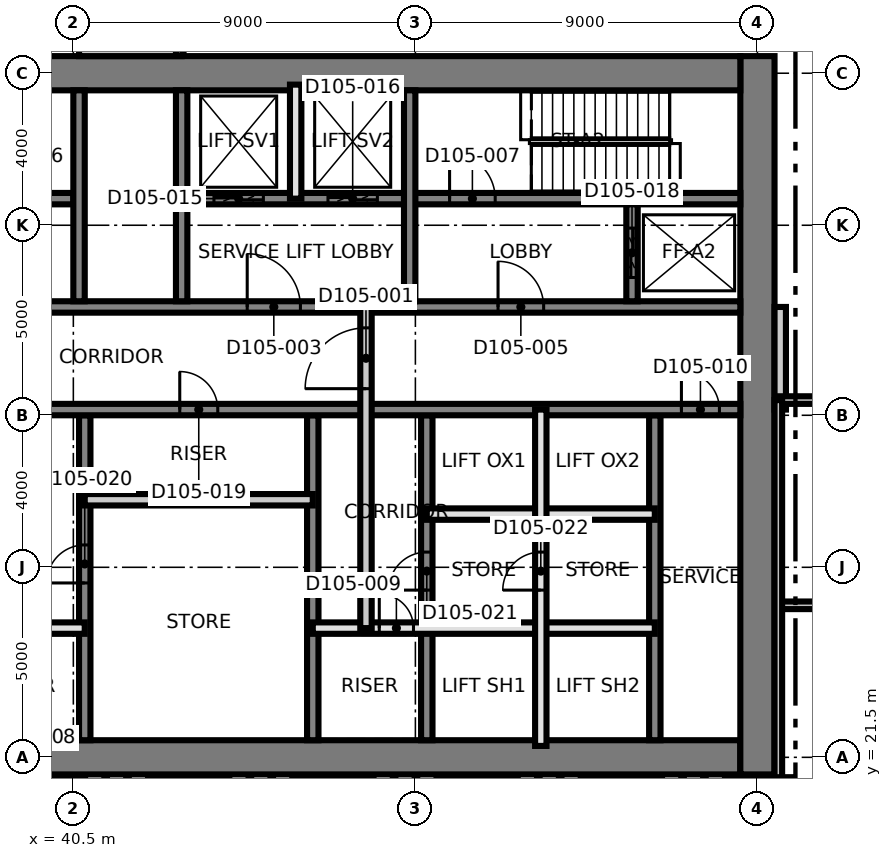
"""IFC4 building model, lengths in metres.
Left out: names, types, materials, properties, quantities, classifications, styles, units other than length and angle.
Written with IfcOpenShell. Run it as: python <this file> out.ifc"""

import sys

from ifc_helpers import new_model, si_unit, direction, frame, frame_2d, origin, place, context, subcontext, project, spatial, rectangle, extrude, element, fill, save


model = new_model("IFC4")
c1 = context("Model", 3, precision=1e-05, world=origin(), true_north=direction((0.0, 1.0)))
c2 = subcontext(c1, "Body", "Model", "MODEL_VIEW")
j1 = project(units=[si_unit("LENGTHUNIT", "METRE"), si_unit("PLANEANGLEUNIT", "RADIAN")], contexts=[c1])
p1 = place(None, origin())
s1 = spatial("IfcSite", under=j1, at=p1, CompositionType="ELEMENT")
p2 = place(p1, origin())
s2 = spatial("IfcBuilding", under=s1, at=p2, CompositionType="ELEMENT")
p3 = place(p2, frame((0.0, 0.0, 18.5)))
s3 = spatial("IfcBuildingStorey", under=s2, at=p3, CompositionType="ELEMENT", Elevation=18.5)
p4 = place(p3, frame((31.05, 21.5, 0.0), z_axis=(0.0, 0.0, 1.0), x_axis=(1.0, 0.0, 0.0)))
e1 = element("IfcWall", 1, at=p4, inside=s3, PredefinedType="SHEAR", context=c2, shape_type="SweptSolid", body=[
    extrude(rectangle(XDim=27.0, YDim=0.9, at=frame_2d((13.5, 0.0))), origin(), (0.0, 0.0, 1.0), 5.0),
])
p5 = place(p3, frame((58.5, 21.05, 0.0), z_axis=(0.0, 0.0, 1.0), x_axis=(0.0, 1.0, 0.0)))
e2 = element("IfcWall", 2, at=p5, inside=s3, PredefinedType="SHEAR", context=c2, shape_type="SweptSolid", body=[
    extrude(rectangle(XDim=18.9, YDim=0.9, at=frame_2d((9.45, 0.0))), origin(), (0.0, 0.0, 1.0), 5.0),
])
p6 = place(p3, frame((31.05, 39.5, 0.0), z_axis=(0.0, 0.0, 1.0), x_axis=(1.0, 0.0, 0.0)))
e3 = element("IfcWall", 3, at=p6, inside=s3, PredefinedType="SHEAR", context=c2, shape_type="SweptSolid", body=[
    extrude(rectangle(XDim=27.0, YDim=0.9, at=frame_2d((13.5, 0.0))), origin(), (0.0, 0.0, 1.0), 5.0),
])
p7 = place(p3, frame((40.8, 21.95, 0.0), z_axis=(0.0, 0.0, 1.0), x_axis=(0.0, 1.0, 0.0)))
e4 = element("IfcWall", 4, at=p7, inside=s3, PredefinedType="SHEAR", context=c2, shape_type="SweptSolid", body=[
    extrude(rectangle(XDim=8.55, YDim=0.3, at=frame_2d((4.275, 0.0))), origin(), (0.0, 0.0, 1.0), 5.0),
])
p8 = place(p7, frame((4.138, 0.0, 0.0)))
e5 = element("IfcOpeningElement", 5, at=p8, cuts=e4, PredefinedType="OPENING", context=c2, shape_type="SweptSolid", body=[
    extrude(rectangle(XDim=1.0, YDim=2.1, at=frame_2d((0.5, 1.05))), frame((0.0, 0.16, 0.0), z_axis=(0.0, -1.0, 0.0), x_axis=(1.0, 0.0, 0.0)), (0.0, 0.0, 1.0), 0.32),
])
p9 = place(p3, frame((46.8, 21.95, 0.0), z_axis=(0.0, 0.0, 1.0), x_axis=(0.0, 1.0, 0.0)))
e6 = element("IfcWall", 6, at=p9, inside=s3, PredefinedType="SHEAR", context=c2, shape_type="SweptSolid", body=[
    extrude(rectangle(XDim=8.55, YDim=0.3, at=frame_2d((4.275, 0.0))), origin(), (0.0, 0.0, 1.0), 5.0),
])
p10 = place(p3, frame((49.8, 21.95, 0.0), z_axis=(0.0, 0.0, 1.0), x_axis=(0.0, 1.0, 0.0)))
e7 = element("IfcWall", 7, at=p10, inside=s3, PredefinedType="SHEAR", context=c2, shape_type="SweptSolid", body=[
    extrude(rectangle(XDim=8.55, YDim=0.3, at=frame_2d((4.275, 0.0))), origin(), (0.0, 0.0, 1.0), 5.0),
])
p11 = place(p10, frame((3.95, 0.0, 0.0)))
e8 = element("IfcOpeningElement", 8, at=p11, cuts=e7, PredefinedType="OPENING", context=c2, shape_type="SweptSolid", body=[
    extrude(rectangle(XDim=1.0, YDim=2.1, at=frame_2d((0.5, 1.05))), frame((0.0, 0.16, 0.0), z_axis=(0.0, -1.0, 0.0), x_axis=(1.0, 0.0, 0.0)), (0.0, 0.0, 1.0), 0.32),
])
p12 = place(p3, frame((55.8, 21.95, 0.0), z_axis=(0.0, 0.0, 1.0), x_axis=(0.0, 1.0, 0.0)))
e9 = element("IfcWall", 9, at=p12, inside=s3, PredefinedType="SHEAR", context=c2, shape_type="SweptSolid", body=[
    extrude(rectangle(XDim=8.55, YDim=0.3, at=frame_2d((4.275, 0.0))), origin(), (0.0, 0.0, 1.0), 5.0),
])
p13 = place(p3, frame((31.95, 30.65, 0.0), z_axis=(0.0, 0.0, 1.0), x_axis=(1.0, 0.0, 0.0)))
e10 = element("IfcWall", 10, at=p13, inside=s3, PredefinedType="SHEAR", context=c2, shape_type="SweptSolid", body=[
    extrude(rectangle(XDim=26.1, YDim=0.3, at=frame_2d((13.05, 0.0))), origin(), (0.0, 0.0, 1.0), 5.0),
])
p14 = place(p13, frame((24.55, 0.0, 0.0)))
e11 = element("IfcOpeningElement", 11, at=p14, cuts=e10, PredefinedType="OPENING", context=c2, shape_type="SweptSolid", body=[
    extrude(rectangle(XDim=1.0, YDim=2.1, at=frame_2d((0.5, 1.05))), frame((0.0, 0.16, 0.0), z_axis=(0.0, -1.0, 0.0), x_axis=(1.0, 0.0, 0.0)), (0.0, 0.0, 1.0), 0.32),
])
p15 = place(p13, frame((11.35, 0.0, 0.0)))
e12 = element("IfcOpeningElement", 12, at=p15, cuts=e10, PredefinedType="OPENING", context=c2, shape_type="SweptSolid", body=[
    extrude(rectangle(XDim=1.0, YDim=2.1, at=frame_2d((0.5, 1.05))), frame((0.0, 0.16, 0.0), z_axis=(0.0, -1.0, 0.0), x_axis=(1.0, 0.0, 0.0)), (0.0, 0.0, 1.0), 0.32),
])
p16 = place(p3, frame((31.95, 33.35, 0.0), z_axis=(0.0, 0.0, 1.0), x_axis=(1.0, 0.0, 0.0)))
e13 = element("IfcWall", 13, at=p16, inside=s3, PredefinedType="SHEAR", context=c2, shape_type="SweptSolid", body=[
    extrude(rectangle(XDim=26.1, YDim=0.3, at=frame_2d((13.05, 0.0))), origin(), (0.0, 0.0, 1.0), 5.0),
])
p17 = place(p16, frame((13.125, 0.0, 0.0)))
e14 = element("IfcOpeningElement", 14, at=p17, cuts=e13, PredefinedType="OPENING", context=c2, shape_type="SweptSolid", body=[
    extrude(rectangle(XDim=1.4, YDim=2.1, at=frame_2d((0.7, 1.05))), frame((0.0, 0.16, 0.0), z_axis=(0.0, -1.0, 0.0), x_axis=(1.0, 0.0, 0.0)), (0.0, 0.0, 1.0), 0.32),
])
p18 = place(p16, frame((5.175, 0.0, 0.0)))
e15 = element("IfcOpeningElement", 15, at=p18, cuts=e13, PredefinedType="OPENING", context=c2, shape_type="SweptSolid", body=[
    extrude(rectangle(XDim=1.2, YDim=2.1, at=frame_2d((0.6, 1.05))), frame((0.0, 0.16, 0.0), z_axis=(0.0, -1.0, 0.0), x_axis=(1.0, 0.0, 0.0)), (0.0, 0.0, 1.0), 0.32),
])
p19 = place(p16, frame((19.725, 0.0, 0.0)))
e16 = element("IfcOpeningElement", 16, at=p19, cuts=e13, PredefinedType="OPENING", context=c2, shape_type="SweptSolid", body=[
    extrude(rectangle(XDim=1.2, YDim=2.1, at=frame_2d((0.6, 1.05))), frame((0.0, 0.16, 0.0), z_axis=(0.0, -1.0, 0.0), x_axis=(1.0, 0.0, 0.0)), (0.0, 0.0, 1.0), 0.32),
])
p20 = place(p3, frame((31.95, 36.2, 0.0), z_axis=(0.0, 0.0, 1.0), x_axis=(1.0, 0.0, 0.0)))
e17 = element("IfcWall", 17, at=p20, inside=s3, PredefinedType="SHEAR", context=c2, shape_type="SweptSolid", body=[
    extrude(rectangle(XDim=8.55, YDim=0.3, at=frame_2d((4.275, 0.0))), origin(), (0.0, 0.0, 1.0), 5.0),
])
p21 = place(p20, frame((6.45, 0.0, 0.0)))
e18 = element("IfcOpeningElement", 18, at=p21, cuts=e17, PredefinedType="OPENING", context=c2, shape_type="SweptSolid", body=[
    extrude(rectangle(XDim=1.2, YDim=2.1, at=frame_2d((0.6, 1.05))), frame((0.0, 0.16, 0.0), z_axis=(0.0, -1.0, 0.0), x_axis=(1.0, 0.0, 0.0)), (0.0, 0.0, 1.0), 0.32),
])
p22 = place(p3, frame((43.5, 36.2, 0.0), z_axis=(0.0, 0.0, 1.0), x_axis=(1.0, 0.0, 0.0)))
e19 = element("IfcWall", 19, at=p22, inside=s3, PredefinedType="SHEAR", context=c2, shape_type="SweptSolid", body=[
    extrude(rectangle(XDim=14.55, YDim=0.3, at=frame_2d((7.275, 0.0))), origin(), (0.0, 0.0, 1.0), 5.0),
])
p23 = place(p22, frame((6.9, 0.0, 0.0)))
e20 = element("IfcOpeningElement", 20, at=p23, cuts=e19, PredefinedType="OPENING", context=c2, shape_type="SweptSolid", body=[
    extrude(rectangle(XDim=1.2, YDim=2.1, at=frame_2d((0.6, 1.05))), frame((0.0, 0.16, 0.0), z_axis=(0.0, -1.0, 0.0), x_axis=(1.0, 0.0, 0.0)), (0.0, 0.0, 1.0), 0.32),
])
p24 = place(p22, frame((0.7, 0.0, 0.0)))
e21 = element("IfcOpeningElement", 21, at=p24, cuts=e19, PredefinedType="OPENING", context=c2, shape_type="SweptSolid", body=[
    extrude(rectangle(XDim=1.3, YDim=2.4, at=frame_2d((0.65, 1.2))), frame((0.0, 0.16, 0.0), z_axis=(0.0, -1.0, 0.0), x_axis=(1.0, 0.0, 0.0)), (0.0, 0.0, 1.0), 0.32),
])
p25 = place(p22, frame((3.7, 0.0, 0.0)))
e22 = element("IfcOpeningElement", 22, at=p25, cuts=e19, PredefinedType="OPENING", context=c2, shape_type="SweptSolid", body=[
    extrude(rectangle(XDim=1.3, YDim=2.4, at=frame_2d((0.65, 1.2))), frame((0.0, 0.16, 0.0), z_axis=(0.0, -1.0, 0.0), x_axis=(1.0, 0.0, 0.0)), (0.0, 0.0, 1.0), 0.32),
])
for number, where, z_axis, x_axis in (
    (23, (40.65, 33.5, 0.0), (0.0, 0.0, 1.0), (0.0, 1.0, 0.0)),
    (24, (43.35, 33.5, 0.0), (0.0, 0.0, 1.0), (0.0, 1.0, 0.0)),
    (25, (49.35, 33.5, 0.0), (0.0, 0.0, 1.0), (0.0, 1.0, 0.0)),
):
    element("IfcWall", number, at=place(p3, frame(where, z_axis=z_axis, x_axis=x_axis)), inside=s3, PredefinedType="SHEAR", context=c2, shape_type="SweptSolid", body=[
        extrude(rectangle(XDim=5.55, YDim=0.3, at=frame_2d((2.775, 0.0))), origin(), (0.0, 0.0, 1.0), 5.0),
    ])
p26 = place(p3, frame((55.2, 33.5, 0.0), z_axis=(0.0, 0.0, 1.0), x_axis=(0.0, 1.0, 0.0)))
e26 = element("IfcWall", 26, at=p26, inside=s3, PredefinedType="SHEAR", context=c2, shape_type="SweptSolid", body=[
    extrude(rectangle(XDim=2.55, YDim=0.3, at=frame_2d((1.275, 0.0))), origin(), (0.0, 0.0, 1.0), 5.0),
])
p27 = place(p26, frame((0.625, 0.0, 0.0)))
e27 = element("IfcOpeningElement", 27, at=p27, cuts=e26, PredefinedType="OPENING", context=c2, shape_type="SweptSolid", body=[
    extrude(rectangle(XDim=1.3, YDim=2.4, at=frame_2d((0.65, 1.2))), frame((0.0, 0.16, 0.0), z_axis=(0.0, -1.0, 0.0), x_axis=(1.0, 0.0, 0.0)), (0.0, 0.0, 1.0), 0.32),
])
p28 = place(p3, frame((31.8, 24.9, 0.0), z_axis=(0.0, 0.0, 1.0), x_axis=(1.0, 0.0, 0.0)))
e28 = element("IfcWall", 28, at=p28, inside=s3, PredefinedType="SOLIDWALL", context=c2, shape_type="SweptSolid", body=[
    extrude(rectangle(XDim=9.0, YDim=0.3, at=frame_2d((4.5, 0.0))), origin(), (0.0, 0.0, 1.0), 4.7),
])
p29 = place(p28, frame((7.05, 0.0, 0.0)))
e29 = element("IfcOpeningElement", 29, at=p29, cuts=e28, PredefinedType="OPENING", context=c2, shape_type="SweptSolid", body=[
    extrude(rectangle(XDim=0.9, YDim=2.1, at=frame_2d((0.45, 1.05))), frame((0.0, 0.16, 0.0), z_axis=(0.0, -1.0, 0.0), x_axis=(1.0, 0.0, 0.0)), (0.0, 0.0, 1.0), 0.32),
])
p30 = place(p28, frame((0.95, 0.0, 0.0)))
e30 = element("IfcOpeningElement", 30, at=p30, cuts=e28, PredefinedType="OPENING", context=c2, shape_type="SweptSolid", body=[
    extrude(rectangle(XDim=1.1, YDim=2.4, at=frame_2d((0.55, 1.2))), frame((0.0, 0.16, 0.0), z_axis=(0.0, -1.0, 0.0), x_axis=(1.0, 0.0, 0.0)), (0.0, 0.0, 1.0), 0.32),
])
p31 = place(p28, frame((3.95, 0.0, 0.0)))
e31 = element("IfcOpeningElement", 31, at=p31, cuts=e28, PredefinedType="OPENING", context=c2, shape_type="SweptSolid", body=[
    extrude(rectangle(XDim=1.1, YDim=2.4, at=frame_2d((0.55, 1.2))), frame((0.0, 0.16, 0.0), z_axis=(0.0, -1.0, 0.0), x_axis=(1.0, 0.0, 0.0)), (0.0, 0.0, 1.0), 0.32),
])
p32 = place(p3, frame((46.8, 24.9, 0.0), z_axis=(0.0, 0.0, 1.0), x_axis=(1.0, 0.0, 0.0)))
e32 = element("IfcWall", 32, at=p32, inside=s3, PredefinedType="SOLIDWALL", context=c2, shape_type="SweptSolid", body=[
    extrude(rectangle(XDim=9.0, YDim=0.3, at=frame_2d((4.5, 0.0))), origin(), (0.0, 0.0, 1.0), 4.7),
])
p33 = place(p32, frame((1.75, 0.0, 0.0)))
e33 = element("IfcOpeningElement", 33, at=p33, cuts=e32, PredefinedType="OPENING", context=c2, shape_type="SweptSolid", body=[
    extrude(rectangle(XDim=0.9, YDim=2.1, at=frame_2d((0.45, 1.05))), frame((0.0, 0.16, 0.0), z_axis=(0.0, -1.0, 0.0), x_axis=(1.0, 0.0, 0.0)), (0.0, 0.0, 1.0), 0.32),
])
p34 = place(p3, frame((49.8, 27.9, 0.0), z_axis=(0.0, 0.0, 1.0), x_axis=(1.0, 0.0, 0.0)))
e34 = element("IfcWall", 34, at=p34, inside=s3, PredefinedType="SOLIDWALL", context=c2, shape_type="SweptSolid", body=[
    extrude(rectangle(XDim=6.0, YDim=0.3, at=frame_2d((3.0, 0.0))), origin(), (0.0, 0.0, 1.0), 4.7),
])
p35 = place(p3, frame((40.8, 28.277, 0.0), z_axis=(0.0, 0.0, 1.0), x_axis=(1.0, 0.0, 0.0)))
e35 = element("IfcWall", 35, at=p35, inside=s3, PredefinedType="PARTITIONING", context=c2, shape_type="SweptSolid", body=[
    extrude(rectangle(XDim=6.0, YDim=0.3, at=frame_2d((3.0, 0.0))), origin(), (0.0, 0.0, 1.0), 4.7),
])
p36 = place(p3, frame((40.65, 40.1, 0.0), z_axis=(0.0, 0.0, 1.0), x_axis=(1.0, 0.0, 0.0)))
e36 = element("IfcWall", 36, at=p36, inside=s3, PredefinedType="PARTITIONING", context=c2, shape_type="SweptSolid", body=[
    extrude(rectangle(XDim=2.7, YDim=0.3, at=frame_2d((1.35, 0.0))), origin(), (0.0, 0.0, 1.0), 4.7),
])
p37 = place(p3, frame((46.35, 36.2, 0.0), z_axis=(0.0, 0.0, 1.0), x_axis=(0.0, 1.0, 0.0)))
e37 = element("IfcWall", 37, at=p37, inside=s3, PredefinedType="SOLIDWALL", context=c2, shape_type="SweptSolid", body=[
    extrude(rectangle(XDim=3.0, YDim=0.3, at=frame_2d((1.5, 0.0))), origin(), (0.0, 0.0, 1.0), 4.7),
])
p38 = place(p3, frame((48.2, 24.9, 0.0), z_axis=(0.0, 0.0, 1.0), x_axis=(0.0, 1.0, 0.0)))
e38 = element("IfcWall", 38, at=p38, inside=s3, PredefinedType="PARTITIONING", context=c2, shape_type="SweptSolid", body=[
    extrude(rectangle(XDim=8.45, YDim=0.3, at=frame_2d((4.225, 0.0))), origin(), (0.0, 0.0, 1.0), 4.7),
])
p39 = place(p38, frame((6.3, 0.0, 0.0)))
e39 = element("IfcOpeningElement", 39, at=p39, cuts=e38, PredefinedType="OPENING", context=c2, shape_type="SweptSolid", body=[
    extrude(rectangle(XDim=1.6, YDim=2.1, at=frame_2d((0.8, 1.05))), frame((0.0, 0.16, 0.0), z_axis=(0.0, -1.0, 0.0), x_axis=(1.0, 0.0, 0.0)), (0.0, 0.0, 1.0), 0.32),
])
p40 = place(p3, frame((52.8, 21.8, 0.0), z_axis=(0.0, 0.0, 1.0), x_axis=(0.0, 1.0, 0.0)))
e40 = element("IfcWall", 40, at=p40, inside=s3, PredefinedType="SOLIDWALL", context=c2, shape_type="SweptSolid", body=[
    extrude(rectangle(XDim=8.85, YDim=0.3, at=frame_2d((4.425, 0.0))), origin(), (0.0, 0.0, 1.0), 4.7),
])
p41 = place(p40, frame((4.1, 0.0, 0.0)))
e41 = element("IfcOpeningElement", 41, at=p41, cuts=e40, PredefinedType="OPENING", context=c2, shape_type="SweptSolid", body=[
    extrude(rectangle(XDim=1.0, YDim=2.1, at=frame_2d((0.5, 1.05))), frame((0.0, 0.16, 0.0), z_axis=(0.0, -1.0, 0.0), x_axis=(1.0, 0.0, 0.0)), (0.0, 0.0, 1.0), 0.32),
])
p42 = place(p3, frame((59.1, 30.65, 0.0), z_axis=(0.0, 0.0, 1.0), x_axis=(0.0, 1.0, 0.0)))
e42 = element("IfcWall", 42, at=p42, inside=s3, PredefinedType="PARTITIONING", context=c2, shape_type="SweptSolid", body=[
    extrude(rectangle(XDim=2.7, YDim=0.3, at=frame_2d((1.35, 0.0))), origin(), (0.0, 0.0, 1.0), 4.7),
])
p43 = place(p3, frame((59.05, 25.5, 0.0), z_axis=(0.0, 0.0, 1.0), x_axis=(1.0, 0.0, 0.0)))
e43 = element("IfcWall", 43, at=p43, inside=s3, PredefinedType="PARTITIONING", context=c2, shape_type="SweptSolid", body=[
    extrude(rectangle(XDim=23.45, YDim=0.2, at=frame_2d((11.725, 0.0))), origin(), (0.0, 0.0, 1.0), 4.7),
])
p44 = place(p3, frame((58.97, 30.9, 0.0), z_axis=(0.0, 0.0, 1.0), x_axis=(1.0, 0.0, 0.0)))
e44 = element("IfcWall", 44, at=p44, inside=s3, PredefinedType="PARTITIONING", context=c2, shape_type="SweptSolid", body=[
    extrude(rectangle(XDim=23.53, YDim=0.2, at=frame_2d((11.765, 0.0))), origin(), (0.0, 0.0, 1.0), 4.7),
])
p45 = place(p44, frame((13.98, 0.0, 0.0)))
e45 = element("IfcOpeningElement", 45, at=p45, cuts=e44, PredefinedType="OPENING", context=c2, shape_type="SweptSolid", body=[
    extrude(rectangle(XDim=1.0, YDim=2.1, at=frame_2d((0.5, 1.05))), frame((0.0, 0.11, 0.0), z_axis=(0.0, -1.0, 0.0), x_axis=(1.0, 0.0, 0.0)), (0.0, 0.0, 1.0), 0.22),
])
p46 = place(p3, frame((43.3, 39.97, 0.0), z_axis=(0.0, 0.0, 1.0), x_axis=(0.0, 1.0, 0.0)))
e46 = element("IfcWall", 46, at=p46, inside=s3, PredefinedType="PARTITIONING", context=c2, shape_type="SweptSolid", body=[
    extrude(rectangle(XDim=2.28, YDim=0.2, at=frame_2d((1.14, 0.0))), origin(), (0.0, 0.0, 1.0), 4.7),
])
p47 = place(p3, frame((59.05, 11.07, 0.0), z_axis=(0.0, 0.0, 1.0), x_axis=(0.0, 1.0, 0.0)))
e47 = element("IfcWall", 47, at=p47, inside=s3, PredefinedType="PARTITIONING", context=c2, shape_type="SweptSolid", body=[
    extrude(rectangle(XDim=19.83, YDim=0.2, at=frame_2d((9.915, 0.0))), origin(), (0.0, 0.0, 1.0), 4.7),
])
p48 = place(p39, origin())
e48 = element("IfcDoor", 48, at=p48, inside=s3, OperationType="SINGLE_SWING_LEFT", PredefinedType="DOOR", context=c2, shape_type="SweptSolid", body=[
    extrude(rectangle(XDim=1.6, YDim=2.1, at=frame_2d((0.8, 1.05))), frame((0.0, 0.025, 0.0), z_axis=(0.0, -1.0, 0.0), x_axis=(1.0, 0.0, 0.0)), (0.0, 0.0, 1.0), 0.05),
])
fill(e39, e48)
p49 = place(p17, origin())
e49 = element("IfcDoor", 49, at=p49, inside=s3, OperationType="SINGLE_SWING_RIGHT", PredefinedType="DOOR", context=c2, shape_type="SweptSolid", body=[
    extrude(rectangle(XDim=1.4, YDim=2.1, at=frame_2d((0.7, 1.05))), frame((0.0, 0.025, 0.0), z_axis=(0.0, -1.0, 0.0), x_axis=(1.0, 0.0, 0.0)), (0.0, 0.0, 1.0), 0.05),
])
fill(e14, e49)
p50 = place(p19, origin())
e50 = element("IfcDoor", 50, at=p50, inside=s3, OperationType="SINGLE_SWING_RIGHT", PredefinedType="DOOR", context=c2, shape_type="SweptSolid", body=[
    extrude(rectangle(XDim=1.2, YDim=2.1, at=frame_2d((0.6, 1.05))), frame((0.0, 0.025, 0.0), z_axis=(0.0, -1.0, 0.0), x_axis=(1.0, 0.0, 0.0)), (0.0, 0.0, 1.0), 0.05),
])
fill(e16, e50)
p51 = place(p23, origin())
e51 = element("IfcDoor", 51, at=p51, inside=s3, OperationType="SINGLE_SWING_LEFT", PredefinedType="DOOR", context=c2, shape_type="SweptSolid", body=[
    extrude(rectangle(XDim=1.2, YDim=2.1, at=frame_2d((0.6, 1.05))), frame((0.0, 0.025, 0.0), z_axis=(0.0, -1.0, 0.0), x_axis=(1.0, 0.0, 0.0)), (0.0, 0.0, 1.0), 0.05),
])
fill(e20, e51)
p52 = place(p33, origin())
e52 = element("IfcDoor", 52, at=p52, inside=s3, OperationType="SINGLE_SWING_RIGHT", PredefinedType="DOOR", context=c2, shape_type="SweptSolid", body=[
    extrude(rectangle(XDim=0.9, YDim=2.1, at=frame_2d((0.45, 1.05))), frame((0.0, 0.025, 0.0), z_axis=(0.0, -1.0, 0.0), x_axis=(1.0, 0.0, 0.0)), (0.0, 0.0, 1.0), 0.05),
])
fill(e33, e52)
p53 = place(p14, origin())
e53 = element("IfcDoor", 53, at=p53, inside=s3, OperationType="SINGLE_SWING_LEFT", PredefinedType="DOOR", context=c2, shape_type="SweptSolid", body=[
    extrude(rectangle(XDim=1.0, YDim=2.1, at=frame_2d((0.5, 1.05))), frame((0.0, 0.025, 0.0), z_axis=(0.0, -1.0, 0.0), x_axis=(1.0, 0.0, 0.0)), (0.0, 0.0, 1.0), 0.05),
])
fill(e11, e53)
p54 = place(p24, origin())
e54 = element("IfcDoor", 54, at=p54, inside=s3, OperationType="SLIDING_TO_LEFT", PredefinedType="DOOR", context=c2, shape_type="SweptSolid", body=[
    extrude(rectangle(XDim=1.3, YDim=2.4, at=frame_2d((0.65, 1.2))), frame((0.0, 0.025, 0.0), z_axis=(0.0, -1.0, 0.0), x_axis=(1.0, 0.0, 0.0)), (0.0, 0.0, 1.0), 0.05),
])
fill(e21, e54)
p55 = place(p25, origin())
e55 = element("IfcDoor", 55, at=p55, inside=s3, OperationType="SLIDING_TO_LEFT", PredefinedType="DOOR", context=c2, shape_type="SweptSolid", body=[
    extrude(rectangle(XDim=1.3, YDim=2.4, at=frame_2d((0.65, 1.2))), frame((0.0, 0.025, 0.0), z_axis=(0.0, -1.0, 0.0), x_axis=(1.0, 0.0, 0.0)), (0.0, 0.0, 1.0), 0.05),
])
fill(e22, e55)
p56 = place(p27, origin())
e56 = element("IfcDoor", 56, at=p56, inside=s3, OperationType="SLIDING_TO_LEFT", PredefinedType="DOOR", context=c2, shape_type="SweptSolid", body=[
    extrude(rectangle(XDim=1.3, YDim=2.4, at=frame_2d((0.65, 1.2))), frame((0.0, 0.025, 0.0), z_axis=(0.0, -1.0, 0.0), x_axis=(1.0, 0.0, 0.0)), (0.0, 0.0, 1.0), 0.05),
])
fill(e27, e56)
p57 = place(p15, origin())
e57 = element("IfcDoor", 57, at=p57, inside=s3, OperationType="SINGLE_SWING_LEFT", PredefinedType="DOOR", context=c2, shape_type="SweptSolid", body=[
    extrude(rectangle(XDim=1.0, YDim=2.1, at=frame_2d((0.5, 1.05))), frame((0.0, 0.025, 0.0), z_axis=(0.0, -1.0, 0.0), x_axis=(1.0, 0.0, 0.0)), (0.0, 0.0, 1.0), 0.05),
])
fill(e12, e57)
p58 = place(p8, origin())
e58 = element("IfcDoor", 58, at=p58, inside=s3, OperationType="SINGLE_SWING_RIGHT", PredefinedType="DOOR", context=c2, shape_type="SweptSolid", body=[
    extrude(rectangle(XDim=1.0, YDim=2.1, at=frame_2d((0.5, 1.05))), frame((0.0, 0.025, 0.0), z_axis=(0.0, -1.0, 0.0), x_axis=(1.0, 0.0, 0.0)), (0.0, 0.0, 1.0), 0.05),
])
fill(e5, e58)
p59 = place(p11, origin())
e59 = element("IfcDoor", 59, at=p59, inside=s3, OperationType="SINGLE_SWING_LEFT", PredefinedType="DOOR", context=c2, shape_type="SweptSolid", body=[
    extrude(rectangle(XDim=1.0, YDim=2.1, at=frame_2d((0.5, 1.05))), frame((0.0, 0.025, 0.0), z_axis=(0.0, -1.0, 0.0), x_axis=(1.0, 0.0, 0.0)), (0.0, 0.0, 1.0), 0.05),
])
fill(e8, e59)
p60 = place(p41, origin())
e60 = element("IfcDoor", 60, at=p60, inside=s3, OperationType="SINGLE_SWING_RIGHT", PredefinedType="DOOR", context=c2, shape_type="SweptSolid", body=[
    extrude(rectangle(XDim=1.0, YDim=2.1, at=frame_2d((0.5, 1.05))), frame((0.0, 0.025, 0.0), z_axis=(0.0, -1.0, 0.0), x_axis=(1.0, 0.0, 0.0)), (0.0, 0.0, 1.0), 0.05),
])
fill(e41, e60)
save(model, sys.argv[1])
